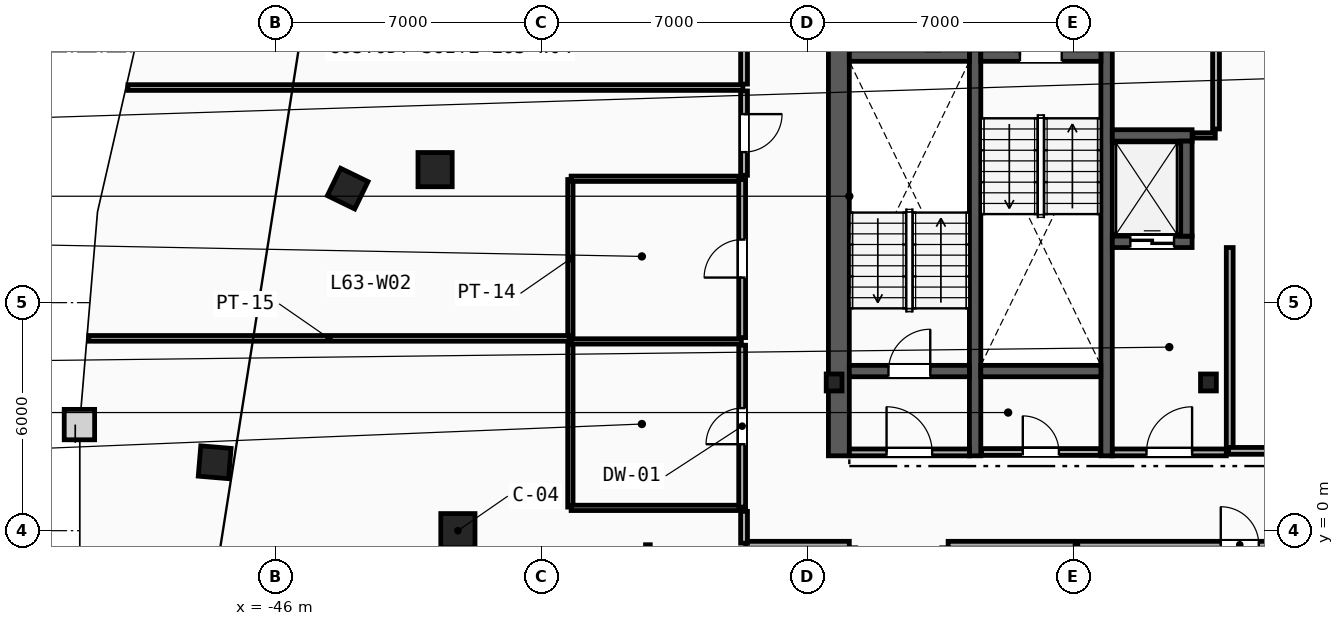
"""IFC4 building model, lengths in metres.
Left out: names, types, materials, properties, quantities, classifications, styles, units other than length and angle.
Written with IfcOpenShell. Run it as: python <this file> out.ifc"""

import sys

from ifc_helpers import new_model, si_unit, direction, frame, frame_2d, origin, origin_2d, place, context, subcontext, project, spatial, rectangle, i_section, extrude, element, fill, save


model = new_model("IFC4")
c1 = context("Model", 3, precision=1e-05, world=origin(), true_north=direction((0.0, 1.0)))
c2 = subcontext(c1, "Body", "Model", "MODEL_VIEW")
j1 = project(units=[si_unit("LENGTHUNIT", "METRE"), si_unit("PLANEANGLEUNIT", "RADIAN")], contexts=[c1])
p1 = place(None, origin())
s1 = spatial("IfcSite", under=j1, at=p1, CompositionType="ELEMENT")
p2 = place(p1, origin())
s2 = spatial("IfcBuilding", under=s1, at=p2, CompositionType="ELEMENT")
p3 = place(p2, frame((0.0, 0.0, 239.6)))
s3 = spatial("IfcBuildingStorey", under=s2, at=p3, CompositionType="ELEMENT", Elevation=239.6)
for number, where, z_axis, x_axis in (
    (1, (-31.3, 3.9, 0.0), (0.0, 0.0, 1.0), (1.0, 0.0, 0.0)),
    (2, (-21.45, 3.9, 0.0), (0.0, 0.0, 1.0), (1.0, 0.0, 0.0)),
):
    element("IfcColumn", number, at=place(p3, frame(where, z_axis=z_axis, x_axis=x_axis)), inside=s3, PredefinedType="COLUMN", context=c2, shape_type="SweptSolid", body=[
        extrude(i_section(OverallWidth=0.416, OverallDepth=0.446, WebThickness=0.039, FlangeThickness=0.063, FilletRadius=0.018, at=origin_2d()), origin(), (0.0, 0.0, 1.0), 3.6),
    ])
for number, where, z_axis, x_axis in (
    (3, (-41.2, 0.0, 0.0), (0.0, 0.0, 1.0), (1.0, 0.0, 0.0)),
    (4, (-41.8, 9.5, 0.0), (0.0, 0.0, 1.0), (1.0, 0.0, 0.0)),
):
    element("IfcColumn", number, at=place(p3, frame(where, z_axis=z_axis, x_axis=x_axis)), inside=s3, PredefinedType="COLUMN", context=c2, shape_type="SweptSolid", body=[
        extrude(rectangle(XDim=0.9, YDim=0.9, at=origin_2d()), origin(), (0.0, 0.0, 1.0), 3.6),
    ])
for number, where, z_axis, x_axis in (
    (5, (-44.1, 9.0, 0.0), (0.0, 0.0, 1.0), (-0.437, -0.899, 0.0)),
    (6, (-47.6, 1.8, 0.0), (0.0, 0.0, 1.0), (-0.084, -0.997, 0.0)),
):
    element("IfcColumn", number, at=place(p3, frame(where, z_axis=z_axis, x_axis=x_axis)), inside=s3, PredefinedType="COLUMN", context=c2, shape_type="SweptSolid", body=[
        extrude(rectangle(XDim=0.8, YDim=0.8, at=origin_2d()), origin(), (0.0, 0.0, 1.0), 3.6),
    ])
p4 = place(p3, frame((-31.175, 1.97, 0.0), z_axis=(0.0, 0.0, 1.0), x_axis=(0.0, 1.0, 0.0)))
e7 = element("IfcWall", 7, at=p4, inside=s3, PredefinedType="SHEAR", context=c2, shape_type="SweptSolid", body=[
    extrude(rectangle(XDim=13.33, YDim=0.55, at=frame_2d((6.665, 0.0))), origin(), (0.0, 0.0, 1.0), 3.34),
])
for number, where, z_axis, x_axis in (
    (8, (-27.59, 1.97, 0.0), (0.0, 0.0, 1.0), (0.0, 1.0, 0.0)),
    (9, (-24.13, 1.97, 0.0), (0.0, 0.0, 1.0), (0.0, 1.0, 0.0)),
):
    element("IfcWall", number, at=place(p3, frame(where, z_axis=z_axis, x_axis=x_axis)), inside=s3, PredefinedType="SHEAR", context=c2, shape_type="SweptSolid", body=[
        extrude(rectangle(XDim=10.68, YDim=0.3, at=frame_2d((5.34, 0.0))), origin(), (0.0, 0.0, 1.0), 3.34),
    ])
p5 = place(p3, frame((-30.9, 4.2, 0.0), z_axis=(0.0, 0.0, 1.0), x_axis=(1.0, 0.0, 0.0)))
e10 = element("IfcWall", 10, at=p5, inside=s3, PredefinedType="SHEAR", context=c2, shape_type="SweptSolid", body=[
    extrude(rectangle(XDim=3.16, YDim=0.3, at=frame_2d((1.58, 0.0))), origin(), (0.0, 0.0, 1.0), 3.34),
])
p6 = place(p5, frame((1.03, 0.0, 0.0)))
e11 = element("IfcOpeningElement", 11, at=p6, cuts=e10, PredefinedType="OPENING", context=c2, shape_type="SweptSolid", body=[
    extrude(rectangle(XDim=1.1, YDim=2.15, at=frame_2d((0.55, 1.075))), frame((0.0, 0.16, 0.0), z_axis=(0.0, -1.0, 0.0), x_axis=(1.0, 0.0, 0.0)), (0.0, 0.0, 1.0), 0.32),
])
p7 = place(p3, frame((-30.9, 12.5, 0.0), z_axis=(0.0, 0.0, 1.0), x_axis=(1.0, 0.0, 0.0)))
e12 = element("IfcWall", 12, at=p7, inside=s3, PredefinedType="SHEAR", context=c2, shape_type="SweptSolid", body=[
    extrude(rectangle(XDim=3.16, YDim=0.3, at=frame_2d((1.58, 0.0))), origin(), (0.0, 0.0, 1.0), 3.34),
])
p8 = place(p3, frame((-27.44, 12.5, 0.0), z_axis=(0.0, 0.0, 1.0), x_axis=(1.0, 0.0, 0.0)))
e13 = element("IfcWall", 13, at=p8, inside=s3, PredefinedType="SHEAR", context=c2, shape_type="SweptSolid", body=[
    extrude(rectangle(XDim=3.16, YDim=0.3, at=frame_2d((1.58, 0.0))), origin(), (0.0, 0.0, 1.0), 3.34),
])
p9 = place(p8, frame((1.03, 0.0, 0.0)))
e14 = element("IfcOpeningElement", 14, at=p9, cuts=e13, PredefinedType="OPENING", context=c2, shape_type="SweptSolid", body=[
    extrude(rectangle(XDim=1.1, YDim=2.15, at=frame_2d((0.55, 1.075))), frame((0.0, 0.16, 0.0), z_axis=(0.0, -1.0, 0.0), x_axis=(1.0, 0.0, 0.0)), (0.0, 0.0, 1.0), 0.32),
])
p10 = place(p3, frame((-27.44, 4.2, 0.0), z_axis=(0.0, 0.0, 1.0), x_axis=(1.0, 0.0, 0.0)))
e15 = element("IfcWall", 15, at=p10, inside=s3, PredefinedType="SHEAR", context=c2, shape_type="SweptSolid", body=[
    extrude(rectangle(XDim=3.16, YDim=0.3, at=frame_2d((1.58, 0.0))), origin(), (0.0, 0.0, 1.0), 3.34),
])
p11 = place(p3, frame((-20.89, 2.15, 0.0), z_axis=(0.0, 0.0, 1.0), x_axis=(0.0, 1.0, 0.0)))
e16 = element("IfcWall", 16, at=p11, inside=s3, PredefinedType="PARTITIONING", context=c2, shape_type="SweptSolid", body=[
    extrude(rectangle(XDim=5.3, YDim=0.18, at=frame_2d((2.65, 0.0))), origin(), (0.0, 0.0, 1.0), 3.34),
])
p12 = place(p3, frame((-23.98, 2.06, 0.0), z_axis=(0.0, 0.0, 1.0), x_axis=(1.0, 0.0, 0.0)))
e17 = element("IfcWall", 17, at=p12, inside=s3, PredefinedType="PARTITIONING", context=c2, shape_type="SweptSolid", body=[
    extrude(rectangle(XDim=3.0, YDim=0.18, at=frame_2d((1.5, 0.0))), origin(), (0.0, 0.0, 1.0), 3.34),
])
p13 = place(p12, frame((0.9, 0.0, 0.0)))
e18 = element("IfcOpeningElement", 18, at=p13, cuts=e17, PredefinedType="OPENING", context=c2, shape_type="SweptSolid", body=[
    extrude(rectangle(XDim=1.2, YDim=2.15, at=frame_2d((0.6, 1.075))), frame((0.0, 0.1, 0.0), z_axis=(0.0, -1.0, 0.0), x_axis=(1.0, 0.0, 0.0)), (0.0, 0.0, 1.0), 0.2),
])
p14 = place(p3, frame((-30.9, 2.06, 0.0), z_axis=(0.0, 0.0, 1.0), x_axis=(1.0, 0.0, 0.0)))
e19 = element("IfcWall", 19, at=p14, inside=s3, PredefinedType="PARTITIONING", context=c2, shape_type="SweptSolid", body=[
    extrude(rectangle(XDim=3.16, YDim=0.18, at=frame_2d((1.58, 0.0))), origin(), (0.0, 0.0, 1.0), 3.34),
])
p15 = place(p14, frame((0.98, 0.0, 0.0)))
e20 = element("IfcOpeningElement", 20, at=p15, cuts=e19, PredefinedType="OPENING", context=c2, shape_type="SweptSolid", body=[
    extrude(rectangle(XDim=1.2, YDim=2.15, at=frame_2d((0.6, 1.075))), frame((0.0, 0.1, 0.0), z_axis=(0.0, -1.0, 0.0), x_axis=(1.0, 0.0, 0.0)), (0.0, 0.0, 1.0), 0.2),
])
p16 = place(p3, frame((-23.98, 7.6, 0.0), z_axis=(0.0, 0.0, 1.0), x_axis=(1.0, 0.0, 0.0)))
e21 = element("IfcWall", 21, at=p16, inside=s3, PredefinedType="SHEAR", context=c2, shape_type="SweptSolid", body=[
    extrude(rectangle(XDim=2.1, YDim=0.3, at=frame_2d((1.05, 0.0))), origin(), (0.0, 0.0, 1.0), 3.34),
])
p17 = place(p16, frame((0.475, 0.0, 0.0)))
e22 = element("IfcOpeningElement", 22, at=p17, cuts=e21, PredefinedType="OPENING", context=c2, shape_type="SweptSolid", body=[
    extrude(rectangle(XDim=1.15, YDim=2.2, at=frame_2d((0.575, 1.1))), frame((0.0, 0.16, 0.0), z_axis=(0.0, -1.0, 0.0), x_axis=(1.0, 0.0, 0.0)), (0.0, 0.0, 1.0), 0.32),
])
p18 = place(p3, frame((-23.98, 10.4, 0.0), z_axis=(0.0, 0.0, 1.0), x_axis=(1.0, 0.0, 0.0)))
e23 = element("IfcWall", 23, at=p18, inside=s3, PredefinedType="SHEAR", context=c2, shape_type="SweptSolid", body=[
    extrude(rectangle(XDim=2.1, YDim=0.3, at=frame_2d((1.05, 0.0))), origin(), (0.0, 0.0, 1.0), 3.34),
])
p19 = place(p3, frame((-22.03, 7.75, 0.0), z_axis=(0.0, 0.0, 1.0), x_axis=(0.0, 1.0, 0.0)))
e24 = element("IfcWall", 24, at=p19, inside=s3, PredefinedType="SHEAR", context=c2, shape_type="SweptSolid", body=[
    extrude(rectangle(XDim=2.5, YDim=0.3, at=frame_2d((1.25, 0.0))), origin(), (0.0, 0.0, 1.0), 3.34),
])
p20 = place(p3, frame((-21.86, 10.4, 0.0), z_axis=(0.0, 0.0, 1.0), x_axis=(1.0, 0.0, 0.0)))
e25 = element("IfcWall", 25, at=p20, inside=s3, PredefinedType="PARTITIONING", context=c2, shape_type="SweptSolid", body=[
    extrude(rectangle(XDim=0.59, YDim=0.14, at=frame_2d((0.295, 0.0))), origin(), (0.0, 0.0, 1.0), 3.34),
])
p21 = place(p3, frame((-21.25, 10.57, 0.0), z_axis=(0.0, 0.0, 1.0), x_axis=(0.0, 1.0, 0.0)))
e26 = element("IfcWall", 26, at=p21, inside=s3, PredefinedType="PARTITIONING", context=c2, shape_type="SweptSolid", body=[
    extrude(rectangle(XDim=4.36, YDim=0.18, at=frame_2d((2.18, 0.0))), origin(), (0.0, 0.0, 1.0), 3.34),
])
p22 = place(p3, frame((-27.42, 2.07, 0.0), z_axis=(0.0, 0.0, 1.0), x_axis=(1.0, 0.0, 0.0)))
e27 = element("IfcWall", 27, at=p22, inside=s3, PredefinedType="PARTITIONING", context=c2, shape_type="SweptSolid", body=[
    extrude(rectangle(XDim=3.12, YDim=0.18, at=frame_2d((1.56, 0.0))), origin(), (0.0, 0.0, 1.0), 3.34),
])
p23 = place(p22, frame((1.085, 0.0, 0.0)))
e28 = element("IfcOpeningElement", 28, at=p23, cuts=e27, PredefinedType="OPENING", context=c2, shape_type="SweptSolid", body=[
    extrude(rectangle(XDim=0.95, YDim=2.1, at=frame_2d((0.475, 1.05))), frame((0.0, 0.1, 0.0), z_axis=(0.0, -1.0, 0.0), x_axis=(1.0, 0.0, 0.0)), (0.0, 0.0, 1.0), 0.2),
])
p24 = place(p3, frame((-38.24, 0.62, 0.0), z_axis=(0.0, 0.0, 1.0), x_axis=(0.0, 1.0, 0.0)))
e29 = element("IfcWall", 29, at=p24, inside=s3, PredefinedType="PARTITIONING", context=c2, shape_type="SweptSolid", body=[
    extrude(rectangle(XDim=4.275, YDim=0.14, at=frame_2d((2.137, 0.0))), origin(), (0.0, 0.0, 1.0), 3.34),
])
p25 = place(p3, frame((-38.24, 5.065, 0.0), z_axis=(0.0, 0.0, 1.0), x_axis=(0.0, 1.0, 0.0)))
e30 = element("IfcWall", 30, at=p25, inside=s3, PredefinedType="PARTITIONING", context=c2, shape_type="SweptSolid", body=[
    extrude(rectangle(XDim=4.175, YDim=0.14, at=frame_2d((2.087, 0.0))), origin(), (0.0, 0.0, 1.0), 3.34),
])
for number, where, z_axis, x_axis in (
    (31, (-38.22, 0.6, 0.0), (0.0, 0.0, 1.0), (1.0, 0.0, 0.0)),
    (32, (-38.22, 4.98, 0.0), (0.0, 0.0, 1.0), (1.0, 0.0, 0.0)),
    (33, (-38.22, 9.26, 0.0), (0.0, 0.0, 1.0), (1.0, 0.0, 0.0)),
):
    element("IfcWall", number, at=place(p3, frame(where, z_axis=z_axis, x_axis=x_axis)), inside=s3, PredefinedType="PARTITIONING", context=c2, shape_type="SweptSolid", body=[
        extrude(rectangle(XDim=4.48, YDim=0.14, at=frame_2d((2.24, 0.0))), origin(), (0.0, 0.0, 1.0), 3.34),
    ])
p26 = place(p3, frame((-33.72, 0.62, 0.0), z_axis=(0.0, 0.0, 1.0), x_axis=(0.0, 1.0, 0.0)))
e34 = element("IfcWall", 34, at=p26, inside=s3, PredefinedType="PARTITIONING", context=c2, shape_type="SweptSolid", body=[
    extrude(rectangle(XDim=4.26, YDim=0.18, at=frame_2d((2.13, 0.0))), origin(), (0.0, 0.0, 1.0), 3.34),
])
p27 = place(p26, frame((1.655, 0.0, 0.0)))
e35 = element("IfcOpeningElement", 35, at=p27, cuts=e34, PredefinedType="OPENING", context=c2, shape_type="SweptSolid", body=[
    extrude(rectangle(XDim=0.95, YDim=2.1, at=frame_2d((0.475, 1.05))), frame((0.0, 0.1, 0.0), z_axis=(0.0, -1.0, 0.0), x_axis=(1.0, 0.0, 0.0)), (0.0, 0.0, 1.0), 0.2),
])
p28 = place(p3, frame((-33.72, 5.08, 0.0), z_axis=(0.0, 0.0, 1.0), x_axis=(0.0, 1.0, 0.0)))
e36 = element("IfcWall", 36, at=p28, inside=s3, PredefinedType="PARTITIONING", context=c2, shape_type="SweptSolid", body=[
    extrude(rectangle(XDim=4.16, YDim=0.18, at=frame_2d((2.08, 0.0))), origin(), (0.0, 0.0, 1.0), 3.34),
])
p29 = place(p28, frame((1.58, 0.0, 0.0)))
e37 = element("IfcOpeningElement", 37, at=p29, cuts=e36, PredefinedType="OPENING", context=c2, shape_type="SweptSolid", body=[
    extrude(rectangle(XDim=1.0, YDim=2.15, at=frame_2d((0.5, 1.075))), frame((0.0, 0.1, 0.0), z_axis=(0.0, -1.0, 0.0), x_axis=(1.0, 0.0, 0.0)), (0.0, 0.0, 1.0), 0.2),
])
p30 = place(p3, frame((-36.2, -24.793, 0.0), z_axis=(0.0, 0.0, 1.0), x_axis=(0.0, 1.0, 0.0)))
e38 = element("IfcWall", 38, at=p30, inside=s3, PredefinedType="PARTITIONING", context=c2, shape_type="SweptSolid", body=[
    extrude(rectangle(XDim=24.423, YDim=0.125, at=frame_2d((12.212, 0.0))), origin(), (0.0, 0.0, 1.0), 3.34),
])
p31 = place(p3, frame((-50.913, 5.06, 0.0), z_axis=(0.0, 0.0, 1.0), x_axis=(1.0, 0.0, 0.0)))
e39 = element("IfcWall", 39, at=p31, inside=s3, PredefinedType="PARTITIONING", context=c2, shape_type="SweptSolid", body=[
    extrude(rectangle(XDim=12.643, YDim=0.15, at=frame_2d((6.321, 0.0))), origin(), (0.0, 0.0, 1.0), 3.34),
])
p32 = place(p3, frame((-49.883, 11.66, 0.0), z_axis=(0.0, 0.0, 1.0), x_axis=(1.0, 0.0, 0.0)))
e40 = element("IfcWall", 40, at=p32, inside=s3, PredefinedType="PARTITIONING", context=c2, shape_type="SweptSolid", body=[
    extrude(rectangle(XDim=16.183, YDim=0.15, at=frame_2d((8.091, 0.0))), origin(), (0.0, 0.0, 1.0), 3.34),
])
p33 = place(p3, frame((-28.3, -0.37, 0.0), z_axis=(0.0, 0.0, 1.0), x_axis=(1.0, 0.0, 0.0)))
e41 = element("IfcWall", 41, at=p33, inside=s3, PredefinedType="PARTITIONING", context=c2, shape_type="SweptSolid", body=[
    extrude(rectangle(XDim=15.349, YDim=0.18, at=frame_2d((7.675, 0.0))), origin(), (0.0, 0.0, 1.0), 3.34),
])
p34 = place(p33, frame((7.175, 0.0, 0.0)))
e42 = element("IfcOpeningElement", 42, at=p34, cuts=e41, PredefinedType="OPENING", context=c2, shape_type="SweptSolid", body=[
    extrude(rectangle(XDim=1.0, YDim=2.15, at=frame_2d((0.5, 1.075))), frame((0.0, 0.1, 0.0), z_axis=(0.0, -1.0, 0.0), x_axis=(1.0, 0.0, 0.0)), (0.0, 0.0, 1.0), 0.2),
])
p35 = place(p3, frame((-33.628, -0.37, 0.0), z_axis=(0.0, 0.0, 1.0), x_axis=(1.0, 0.0, 0.0)))
e43 = element("IfcWall", 43, at=p35, inside=s3, PredefinedType="PARTITIONING", context=c2, shape_type="SweptSolid", body=[
    extrude(rectangle(XDim=2.729, YDim=0.18, at=frame_2d((1.364, 0.0))), origin(), (0.0, 0.0, 1.0), 3.34),
])
p36 = place(p3, frame((-33.67, 0.509, 0.0), z_axis=(0.0, 0.0, 1.0), x_axis=(0.0, -1.0, 0.0)))
e44 = element("IfcWall", 44, at=p36, inside=s3, PredefinedType="PARTITIONING", context=c2, shape_type="SweptSolid", body=[
    extrude(rectangle(XDim=0.837, YDim=0.18, at=frame_2d((0.418, 0.0))), origin(), (0.0, 0.0, 1.0), 3.34),
])
p37 = place(p3, frame((-33.67, 11.57, 0.0), z_axis=(0.0, 0.0, 1.0), x_axis=(0.0, -1.0, 0.0)))
e45 = element("IfcWall", 45, at=p37, inside=s3, PredefinedType="PARTITIONING", context=c2, shape_type="SweptSolid", body=[
    extrude(rectangle(XDim=2.219, YDim=0.18, at=frame_2d((1.109, 0.0))), origin(), (0.0, 0.0, 1.0), 3.34),
])
p38 = place(p37, frame((0.609, 0.0, 0.0)))
e46 = element("IfcOpeningElement", 46, at=p38, cuts=e45, PredefinedType="OPENING", context=c2, shape_type="SweptSolid", body=[
    extrude(rectangle(XDim=1.0, YDim=2.15, at=frame_2d((0.5, 1.075))), frame((0.0, 0.1, 0.0), z_axis=(0.0, -1.0, 0.0), x_axis=(1.0, 0.0, 0.0)), (0.0, 0.0, 1.0), 0.2),
])
p39 = place(p3, frame((-16.9, 2.1, 0.0), z_axis=(0.0, 0.0, 1.0), x_axis=(-1.0, 0.0, 0.0)))
e47 = element("IfcWall", 47, at=p39, inside=s3, PredefinedType="PARTITIONING", context=c2, shape_type="SweptSolid", body=[
    extrude(rectangle(XDim=4.02, YDim=0.18, at=frame_2d((2.01, 0.0))), origin(), (0.0, 0.0, 1.0), 3.34),
])
p40 = place(p39, frame((1.51, 0.0, 0.0)))
e48 = element("IfcOpeningElement", 48, at=p40, cuts=e47, PredefinedType="OPENING", context=c2, shape_type="SweptSolid", body=[
    extrude(rectangle(XDim=1.0, YDim=2.15, at=frame_2d((0.5, 1.075))), frame((0.0, 0.1, 0.0), z_axis=(0.0, -1.0, 0.0), x_axis=(1.0, 0.0, 0.0)), (0.0, 0.0, 1.0), 0.2),
])
p41 = place(p3, frame((-33.67, 17.428, 0.0), z_axis=(0.0, 0.0, 1.0), x_axis=(0.0, -1.0, 0.0)))
e49 = element("IfcWall", 49, at=p41, inside=s3, PredefinedType="PARTITIONING", context=c2, shape_type="SweptSolid", body=[
    extrude(rectangle(XDim=5.678, YDim=0.18, at=frame_2d((2.839, 0.0))), origin(), (0.0, 0.0, 1.0), 3.34),
])
p42 = place(p41, frame((2.339, 0.0, 0.0)))
e50 = element("IfcOpeningElement", 50, at=p42, cuts=e49, PredefinedType="OPENING", context=c2, shape_type="SweptSolid", body=[
    extrude(rectangle(XDim=1.0, YDim=2.15, at=frame_2d((0.5, 1.075))), frame((0.0, 0.1, 0.0), z_axis=(0.0, -1.0, 0.0), x_axis=(1.0, 0.0, 0.0)), (0.0, 0.0, 1.0), 0.2),
])
p43 = place(p6, origin())
e51 = element("IfcDoor", 51, at=p43, inside=s3, OperationType="SINGLE_SWING_RIGHT", PredefinedType="DOOR", context=c2, shape_type="SweptSolid", body=[
    extrude(rectangle(XDim=1.1, YDim=2.15, at=frame_2d((0.55, 1.075))), frame((0.0, 0.025, 0.0), z_axis=(0.0, -1.0, 0.0), x_axis=(1.0, 0.0, 0.0)), (0.0, 0.0, 1.0), 0.05),
])
fill(e11, e51)
p44 = place(p9, origin())
e52 = element("IfcDoor", 52, at=p44, inside=s3, OperationType="SINGLE_SWING_LEFT", PredefinedType="DOOR", context=c2, shape_type="SweptSolid", body=[
    extrude(rectangle(XDim=1.1, YDim=2.15, at=frame_2d((0.55, 1.075))), frame((0.0, 0.025, 0.0), z_axis=(0.0, -1.0, 0.0), x_axis=(1.0, 0.0, 0.0)), (0.0, 0.0, 1.0), 0.05),
])
fill(e14, e52)
p45 = place(p13, origin())
e53 = element("IfcDoor", 53, at=p45, inside=s3, OperationType="SINGLE_SWING_RIGHT", PredefinedType="DOOR", context=c2, shape_type="SweptSolid", body=[
    extrude(rectangle(XDim=1.2, YDim=2.15, at=frame_2d((0.6, 1.075))), frame((0.0, 0.025, 0.0), z_axis=(0.0, -1.0, 0.0), x_axis=(1.0, 0.0, 0.0)), (0.0, 0.0, 1.0), 0.05),
])
fill(e18, e53)
p46 = place(p15, origin())
e54 = element("IfcDoor", 54, at=p46, inside=s3, OperationType="SINGLE_SWING_LEFT", PredefinedType="DOOR", context=c2, shape_type="SweptSolid", body=[
    extrude(rectangle(XDim=1.2, YDim=2.15, at=frame_2d((0.6, 1.075))), frame((0.0, 0.025, 0.0), z_axis=(0.0, -1.0, 0.0), x_axis=(1.0, 0.0, 0.0)), (0.0, 0.0, 1.0), 0.05),
])
fill(e20, e54)
p47 = place(p17, origin())
e55 = element("IfcDoor", 55, at=p47, inside=s3, OperationType="SLIDING_TO_LEFT", PredefinedType="TRAPDOOR", context=c2, shape_type="SweptSolid", body=[
    extrude(rectangle(XDim=1.15, YDim=2.2, at=frame_2d((0.575, 1.1))), frame((0.0, 0.025, 0.0), z_axis=(0.0, -1.0, 0.0), x_axis=(1.0, 0.0, 0.0)), (0.0, 0.0, 1.0), 0.05),
])
fill(e22, e55)
p48 = place(p34, origin())
e56 = element("IfcDoor", 56, at=p48, inside=s3, OperationType="SINGLE_SWING_LEFT", PredefinedType="DOOR", context=c2, shape_type="SweptSolid", body=[
    extrude(rectangle(XDim=1.0, YDim=2.15, at=frame_2d((0.5, 1.075))), frame((0.0, 0.025, 0.0), z_axis=(0.0, -1.0, 0.0), x_axis=(1.0, 0.0, 0.0)), (0.0, 0.0, 1.0), 0.05),
])
fill(e42, e56)
p49 = place(p27, origin())
e57 = element("IfcDoor", 57, at=p49, inside=s3, OperationType="SINGLE_SWING_LEFT", PredefinedType="DOOR", context=c2, shape_type="SweptSolid", body=[
    extrude(rectangle(XDim=0.95, YDim=2.1, at=frame_2d((0.475, 1.05))), frame((0.0, 0.025, 0.0), z_axis=(0.0, -1.0, 0.0), x_axis=(1.0, 0.0, 0.0)), (0.0, 0.0, 1.0), 0.05),
])
fill(e35, e57)
p50 = place(p29, origin())
e58 = element("IfcDoor", 58, at=p50, inside=s3, OperationType="SINGLE_SWING_LEFT", PredefinedType="DOOR", context=c2, shape_type="SweptSolid", body=[
    extrude(rectangle(XDim=1.0, YDim=2.15, at=frame_2d((0.5, 1.075))), frame((0.0, 0.025, 0.0), z_axis=(0.0, -1.0, 0.0), x_axis=(1.0, 0.0, 0.0)), (0.0, 0.0, 1.0), 0.05),
])
fill(e37, e58)
p51 = place(p23, origin())
e59 = element("IfcDoor", 59, at=p51, inside=s3, OperationType="SINGLE_SWING_LEFT", PredefinedType="DOOR", context=c2, shape_type="SweptSolid", body=[
    extrude(rectangle(XDim=0.95, YDim=2.1, at=frame_2d((0.475, 1.05))), frame((0.0, 0.025, 0.0), z_axis=(0.0, -1.0, 0.0), x_axis=(1.0, 0.0, 0.0)), (0.0, 0.0, 1.0), 0.05),
])
fill(e28, e59)
p52 = place(p38, origin())
e60 = element("IfcDoor", 60, at=p52, inside=s3, OperationType="SINGLE_SWING_LEFT", PredefinedType="DOOR", context=c2, shape_type="SweptSolid", body=[
    extrude(rectangle(XDim=1.0, YDim=2.15, at=frame_2d((0.5, 1.075))), frame((0.0, 0.025, 0.0), z_axis=(0.0, -1.0, 0.0), x_axis=(1.0, 0.0, 0.0)), (0.0, 0.0, 1.0), 0.05),
])
fill(e46, e60)
save(model, sys.argv[1])
